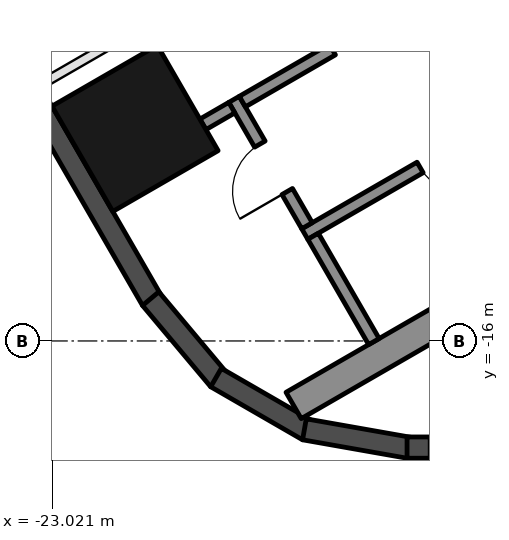
"""IFC4 building model, lengths in metres.
Left out: names, types, materials, properties, quantities, classifications, styles, units other than length and angle.
Written with IfcOpenShell. Run it as: python <this file> out.ifc"""

import sys

from ifc_helpers import new_model, si_unit, direction, frame, frame_2d, origin, origin_2d, place, context, subcontext, project, spatial, rectangle, hollow_rectangle, extrude, boolean, halfspace, element, fill, save


model = new_model("IFC4")
c1 = context("Model", 3, precision=1e-05, world=origin(), true_north=direction((0.0, 1.0)))
c2 = subcontext(c1, "Body", "Model", "MODEL_VIEW")
j1 = project(units=[si_unit("LENGTHUNIT", "METRE"), si_unit("PLANEANGLEUNIT", "RADIAN")], contexts=[c1])
p1 = place(None, origin())
s1 = spatial("IfcSite", under=j1, at=p1, CompositionType="ELEMENT")
p2 = place(p1, origin())
s2 = spatial("IfcBuilding", under=s1, at=p2, CompositionType="ELEMENT")
p3 = place(p2, frame((0.0, 0.0, 283.7)))
s3 = spatial("IfcBuildingStorey", under=s2, at=p3, CompositionType="ELEMENT", Elevation=283.7)
p4 = place(p3, frame((-21.658, -12.504, 0.0), z_axis=(0.0, 0.0, 1.0), x_axis=(-0.5, 0.866025403784, 0.0)))
e1 = element("IfcColumn", 1, at=p4, inside=s3, PredefinedType="COLUMN", context=c2, shape_type="SweptSolid", body=[
    boolean("DIFFERENCE", extrude(hollow_rectangle(XDim=2.0, YDim=2.0, WallThickness=0.05, at=origin_2d()), origin(), (0.0, 0.0, 1.0), 3.7), halfspace(frame((0.0, 0.0, 3.587), z_axis=(0.0, 0.0, 1.0), x_axis=(1.0, 0.0, 0.0)), False)),
])
p5 = place(p3, frame((-23.968, -10.854, 0.0), z_axis=(0.0, 0.0, 1.0), x_axis=(0.500020983425, -0.866013288659, 0.0)))
e2 = element("IfcWall", 2, at=p5, inside=s3, PredefinedType="SOLIDWALL", context=c2, shape_type="SweptSolid", body=[
    extrude(rectangle(XDim=5.168, YDim=0.35, at=frame_2d((2.584, 0.0))), origin(), (0.0, 0.0, 1.0), 3.55),
])
for number, where, z_axis, x_axis in (
    (3, (-21.401, -15.305, 0.0), (0.0, 0.0, 1.0), (0.643, -0.766, 0.0)),
    (4, (-20.327, -16.602, 0.0), (0.0, 0.0, 1.0), (0.866, -0.5, 0.0)),
    (5, (-18.873, -17.453, 0.0), (0.0, 0.0, 1.0), (0.985, -0.174, 0.0)),
):
    element("IfcWall", number, at=place(p3, frame(where, z_axis=z_axis, x_axis=x_axis)), inside=s3, PredefinedType="SOLIDWALL", context=c2, shape_type="SweptSolid", body=[
        extrude(rectangle(XDim=1.745, YDim=0.35, at=frame_2d((0.872, 0.0))), origin(), (0.0, 0.0, 1.0), 3.55),
    ])
p6 = place(p3, frame((-17.185, -17.754, 0.0), z_axis=(0.0, 0.0, 1.0), x_axis=(1.0, 0.0, 0.0)))
e6 = element("IfcWall", 6, at=p6, inside=s3, PredefinedType="SOLIDWALL", context=c2, shape_type="SweptSolid", body=[
    extrude(rectangle(XDim=10.87, YDim=0.35, at=frame_2d((5.435, 0.0))), origin(), (0.0, 0.0, 1.0), 3.55),
])
p7 = place(p6, frame((0.381, 0.0, 0.3)))
e7 = element("IfcOpeningElement", 7, at=p7, cuts=e6, PredefinedType="OPENING", context=c2, shape_type="SweptSolid", body=[
    extrude(rectangle(XDim=1.6, YDim=2.65, at=frame_2d((0.8, 1.325))), frame((0.0, 0.185, 0.0), z_axis=(0.0, -1.0, 0.0), x_axis=(1.0, 0.0, 0.0)), (0.0, 0.0, 1.0), 0.37),
])
p8 = place(p6, frame((6.895, 0.0, 0.0)))
e8 = element("IfcOpeningElement", 8, at=p8, cuts=e6, PredefinedType="OPENING", context=c2, shape_type="SweptSolid", body=[
    extrude(rectangle(XDim=2.4, YDim=2.4, at=frame_2d((1.2, 1.2))), frame((0.0, 0.185, 0.0), z_axis=(0.0, -1.0, 0.0), x_axis=(1.0, 0.0, 0.0)), (0.0, 0.0, 1.0), 0.37),
])
p9 = place(p6, frame((3.43, 0.0, 0.3)))
e9 = element("IfcOpeningElement", 9, at=p9, cuts=e6, PredefinedType="OPENING", context=c2, shape_type="SweptSolid", body=[
    extrude(rectangle(XDim=3.1, YDim=2.65, at=frame_2d((1.55, 1.325))), frame((0.0, 0.185, 0.0), z_axis=(0.0, -1.0, 0.0), x_axis=(1.0, 0.0, 0.0)), (0.0, 0.0, 1.0), 0.37),
])
p10 = place(p3, frame((-8.547, -10.997, 0.0), z_axis=(0.0, 0.0, 1.0), x_axis=(-0.866024688907, -0.500001238203, 0.0)))
e10 = element("IfcWall", 10, at=p10, inside=s3, PredefinedType="SHEAR", context=c2, shape_type="SweptSolid", body=[
    extrude(rectangle(XDim=12.129, YDim=0.5, at=frame_2d((6.064, 0.0))), origin(), (0.0, 0.0, 1.0), 3.5),
])
p11 = place(p3, frame((-10.068, -9.162, 0.0), z_axis=(0.0, 0.0, 1.0), x_axis=(-0.866032725843, -0.499987317609, 0.0)))
e11 = element("IfcWall", 11, at=p11, inside=s3, PredefinedType="SHEAR", context=c2, shape_type="SweptSolid", body=[
    extrude(rectangle(XDim=10.16, YDim=0.2, at=frame_2d((5.08, 0.0))), origin(), (0.0, 0.0, 1.0), 3.5),
])
p12 = place(p11, frame((1.99, 0.0, 0.0)))
e12 = element("IfcOpeningElement", 12, at=p12, cuts=e11, PredefinedType="OPENING", context=c2, shape_type="SweptSolid", body=[
    extrude(rectangle(XDim=0.9, YDim=2.1, at=frame_2d((0.45, 1.05))), frame((0.0, 0.11, 0.0), z_axis=(0.0, -1.0, 0.0), x_axis=(1.0, 0.0, 0.0)), (0.0, 0.0, 1.0), 0.22),
])
p13 = place(p11, frame((7.07, 0.0, 0.0)))
e13 = element("IfcOpeningElement", 13, at=p13, cuts=e11, PredefinedType="OPENING", context=c2, shape_type="SweptSolid", body=[
    extrude(rectangle(XDim=0.9, YDim=2.1, at=frame_2d((0.45, 1.05))), frame((0.0, 0.11, 0.0), z_axis=(0.0, -1.0, 0.0), x_axis=(1.0, 0.0, 0.0)), (0.0, 0.0, 1.0), 0.22),
])
p14 = place(p3, frame((-20.031, -12.026, 0.0), z_axis=(0.0, 0.0, 1.0), x_axis=(0.500033551112, -0.866006032174, 0.0)))
e14 = element("IfcWall", 14, at=p14, inside=s3, PredefinedType="SHEAR", context=c2, shape_type="SweptSolid", body=[
    extrude(rectangle(XDim=2.4, YDim=0.2, at=frame_2d((1.2, 0.0))), origin(), (0.0, 0.0, 1.0), 3.5),
])
p15 = place(p14, frame((0.85, 0.0, 0.0)))
e15 = element("IfcOpeningElement", 15, at=p15, cuts=e14, PredefinedType="OPENING", context=c2, shape_type="SweptSolid", body=[
    extrude(rectangle(XDim=0.9, YDim=2.1, at=frame_2d((0.45, 1.05))), frame((0.0, 0.11, 0.0), z_axis=(0.0, -1.0, 0.0), x_axis=(1.0, 0.0, 0.0)), (0.0, 0.0, 1.0), 0.22),
])
p16 = place(p3, frame((-18.413, -11.208, 0.0), z_axis=(0.0, 0.0, 1.0), x_axis=(-0.866038183914, -0.499977863513, 0.0)))
e16 = element("IfcWall", 16, at=p16, inside=s3, PredefinedType="SHEAR", context=c2, shape_type="SweptSolid", body=[
    extrude(rectangle(XDim=1.71, YDim=0.2, at=frame_2d((0.855, 0.0))), origin(), (0.0, 0.0, 1.0), 3.5),
])
p17 = place(p3, frame((-18.73, -14.278, 0.0), z_axis=(0.0, 0.0, 1.0), x_axis=(0.50002537861, -0.866010750942, 0.0)))
e17 = element("IfcWall", 17, at=p17, inside=s3, PredefinedType="SHEAR", context=c2, shape_type="SweptSolid", body=[
    extrude(rectangle(XDim=2.0, YDim=0.2, at=frame_2d((1.0, 0.0))), origin(), (0.0, 0.0, 1.0), 3.5),
])
p18 = place(p3, frame((-20.067, -12.163, 0.0), z_axis=(0.0, 0.0, 1.0), x_axis=(-0.866044851585, -0.499966313909, 0.0)))
e18 = element("IfcWall", 18, at=p18, inside=s3, PredefinedType="SHEAR", context=c2, shape_type="SweptSolid", body=[
    extrude(rectangle(XDim=0.549, YDim=0.2, at=frame_2d((0.274, 0.0))), origin(), (0.0, 0.0, 1.0), 3.5),
])
p19 = place(p3, frame((-19.363, -9.562, 0.0), z_axis=(0.0, 0.0, 1.0), x_axis=(-0.866024199568, -0.500002085759, 0.0)))
e19 = element("IfcWall", 19, at=p19, inside=s3, PredefinedType="PARTITIONING", context=c2, shape_type="SweptSolid", body=[
    extrude(rectangle(XDim=4.459, YDim=0.15, at=frame_2d((2.229, 0.0))), origin(), (0.0, 0.0, 1.0), 3.5),
])
p20 = place(p13, origin())
e20 = element("IfcDoor", 20, at=p20, inside=s3, OperationType="SINGLE_SWING_LEFT", PredefinedType="DOOR", context=c2, shape_type="SweptSolid", body=[
    extrude(rectangle(XDim=0.9, YDim=2.1, at=frame_2d((0.45, 1.05))), frame((0.0, 0.025, 0.0), z_axis=(0.0, -1.0, 0.0), x_axis=(1.0, 0.0, 0.0)), (0.0, 0.0, 1.0), 0.05),
])
fill(e13, e20)
p21 = place(p15, frame((0.9, 0.0, 0.0), z_axis=(0.0, 0.0, 1.0), x_axis=(-1.0, 0.0, 0.0)))
e21 = element("IfcDoor", 21, at=p21, inside=s3, OperationType="SINGLE_SWING_LEFT", PredefinedType="DOOR", context=c2, shape_type="SweptSolid", body=[
    extrude(rectangle(XDim=0.9, YDim=2.1, at=frame_2d((0.45, 1.05))), frame((0.0, 0.025, 0.0), z_axis=(0.0, -1.0, 0.0), x_axis=(1.0, 0.0, 0.0)), (0.0, 0.0, 1.0), 0.05),
])
fill(e15, e21)
save(model, sys.argv[1])
